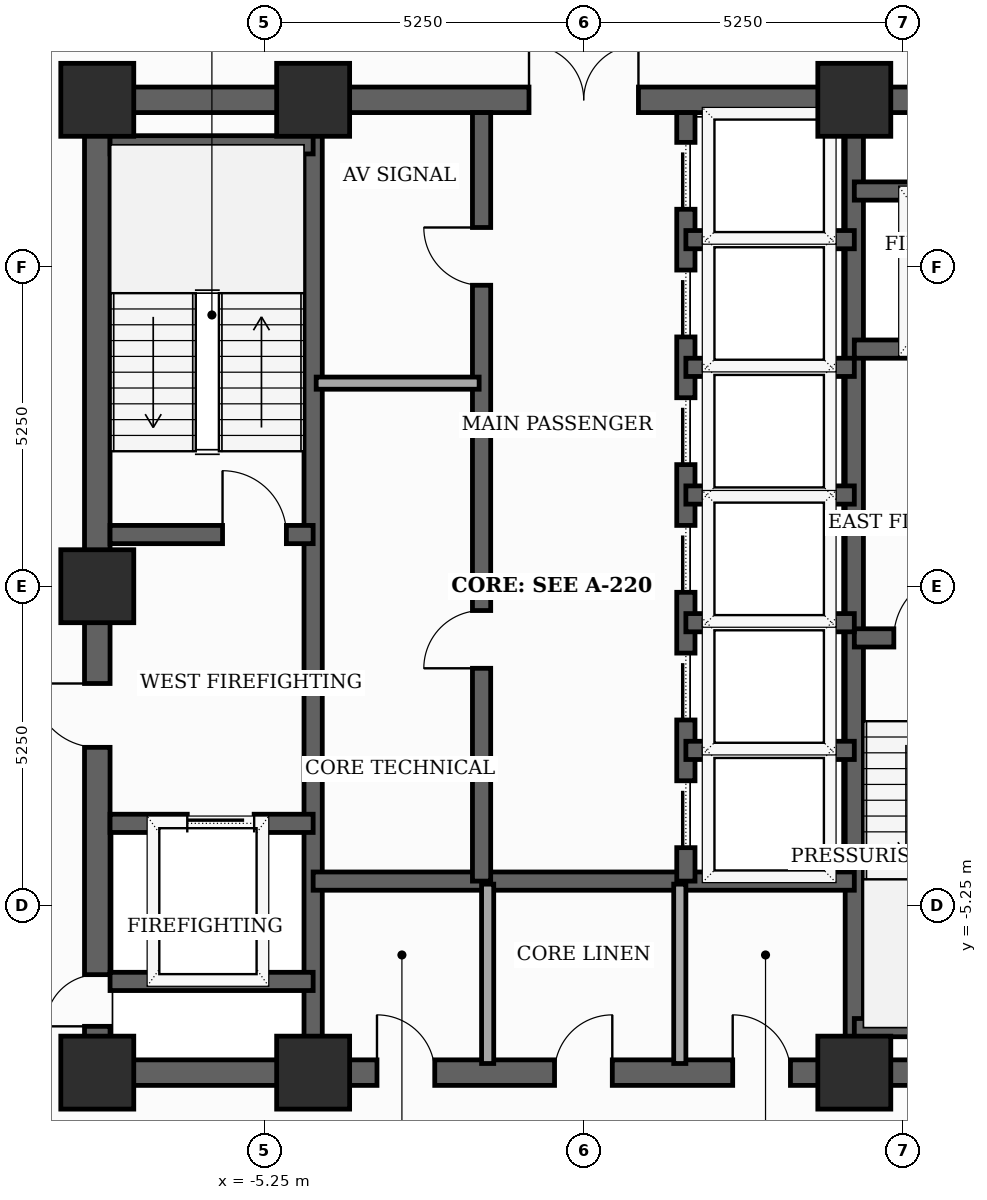
"""IFC4 building model, lengths in metres.
Left out: names, types, materials, properties, quantities, classifications, styles, units other than length and angle.
Written with IfcOpenShell. Run it as: python <this file> out.ifc"""

import sys

from ifc_helpers import new_model, si_unit, direction, frame, frame_2d, origin, origin_2d, place, context, subcontext, project, spatial, rectangle, extrude, element, fill, save


model = new_model("IFC4")
c1 = context("Model", 3, precision=1e-05, world=origin(), true_north=direction((0.0, 1.0)))
c2 = subcontext(c1, "Body", "Model", "MODEL_VIEW")
j1 = project(units=[si_unit("LENGTHUNIT", "METRE"), si_unit("PLANEANGLEUNIT", "RADIAN")], contexts=[c1])
p1 = place(None, origin())
s1 = spatial("IfcSite", under=j1, at=p1, CompositionType="ELEMENT")
p2 = place(p1, origin())
s2 = spatial("IfcBuilding", under=s1, at=p2, CompositionType="ELEMENT")
p3 = place(p2, frame((0.0, 0.0, 202.7)))
s3 = spatial("IfcBuildingStorey", under=s2, at=p3, CompositionType="ELEMENT", Elevation=202.7)
for number, where, z_axis, x_axis in (
    (1, (-8.0, -8.0, 0.0), (0.0, 0.0, 1.0), (1.0, 0.0, 0.0)),
    (2, (-4.45, -8.0, 0.0), (0.0, 0.0, 1.0), (1.0, 0.0, 0.0)),
    (3, (4.45, -8.0, 0.0), (0.0, 0.0, 1.0), (1.0, 0.0, 0.0)),
    (4, (4.45, 8.0, 0.0), (0.0, 0.0, 1.0), (1.0, 0.0, 0.0)),
    (5, (-4.45, 8.0, 0.0), (0.0, 0.0, 1.0), (1.0, 0.0, 0.0)),
    (6, (-8.0, 8.0, 0.0), (0.0, 0.0, 1.0), (1.0, 0.0, 0.0)),
    (7, (-8.0, 0.0, 0.0), (0.0, 0.0, 1.0), (1.0, 0.0, 0.0)),
):
    element("IfcColumn", number, at=place(p3, frame(where, z_axis=z_axis, x_axis=x_axis)), inside=s3, PredefinedType="COLUMN", context=c2, shape_type="SweptSolid", body=[
        extrude(rectangle(XDim=1.2, YDim=1.2, at=origin_2d()), origin(), (0.0, 0.0, 1.0), 3.7),
    ])
p4 = place(p3, frame((-8.0, -8.0, 0.0), z_axis=(0.0, 0.0, 1.0), x_axis=(0.0, 1.0, 0.0)))
e8 = element("IfcWall", 8, at=p4, inside=s3, PredefinedType="SHEAR", context=c2, shape_type="SweptSolid", body=[
    extrude(rectangle(XDim=16.0, YDim=0.42, at=frame_2d((8.0, 0.0))), origin(), (0.0, 0.0, 1.0), 3.5),
])
p5 = place(p4, frame((0.761, 0.0, 0.0)))
e9 = element("IfcOpeningElement", 9, at=p5, cuts=e8, PredefinedType="OPENING", context=c2, shape_type="SweptSolid", body=[
    extrude(rectangle(XDim=0.85, YDim=2.02, at=frame_2d((0.425, 1.01))), frame((0.0, 0.22, 0.0), z_axis=(0.0, -1.0, 0.0), x_axis=(1.0, 0.0, 0.0)), (0.0, 0.0, 1.0), 0.44),
])
p6 = place(p4, frame((5.35, 0.0, 0.0)))
e10 = element("IfcOpeningElement", 10, at=p6, cuts=e8, PredefinedType="OPENING", context=c2, shape_type="SweptSolid", body=[
    extrude(rectangle(XDim=1.05, YDim=2.15, at=frame_2d((0.525, 1.075))), frame((0.0, 0.22, 0.0), z_axis=(0.0, -1.0, 0.0), x_axis=(1.0, 0.0, 0.0)), (0.0, 0.0, 1.0), 0.44),
])
p7 = place(p3, frame((-8.0, -8.0, 0.0), z_axis=(0.0, 0.0, 1.0), x_axis=(1.0, 0.0, 0.0)))
e11 = element("IfcWall", 11, at=p7, inside=s3, PredefinedType="SHEAR", context=c2, shape_type="SweptSolid", body=[
    extrude(rectangle(XDim=16.0, YDim=0.42, at=frame_2d((8.0, 0.0))), origin(), (0.0, 0.0, 1.0), 3.5),
])
p8 = place(p7, frame((4.6, 0.0, 0.0)))
e12 = element("IfcOpeningElement", 12, at=p8, cuts=e11, PredefinedType="OPENING", context=c2, shape_type="SweptSolid", body=[
    extrude(rectangle(XDim=0.95, YDim=2.1, at=frame_2d((0.475, 1.05))), frame((0.0, 0.22, 0.0), z_axis=(0.0, -1.0, 0.0), x_axis=(1.0, 0.0, 0.0)), (0.0, 0.0, 1.0), 0.44),
])
p9 = place(p7, frame((7.52, 0.0, 0.0)))
e13 = element("IfcOpeningElement", 13, at=p9, cuts=e11, PredefinedType="OPENING", context=c2, shape_type="SweptSolid", body=[
    extrude(rectangle(XDim=0.95, YDim=2.1, at=frame_2d((0.475, 1.05))), frame((0.0, 0.22, 0.0), z_axis=(0.0, -1.0, 0.0), x_axis=(1.0, 0.0, 0.0)), (0.0, 0.0, 1.0), 0.44),
])
p10 = place(p7, frame((10.45, 0.0, 0.0)))
e14 = element("IfcOpeningElement", 14, at=p10, cuts=e11, PredefinedType="OPENING", context=c2, shape_type="SweptSolid", body=[
    extrude(rectangle(XDim=0.95, YDim=2.1, at=frame_2d((0.475, 1.05))), frame((0.0, 0.22, 0.0), z_axis=(0.0, -1.0, 0.0), x_axis=(1.0, 0.0, 0.0)), (0.0, 0.0, 1.0), 0.44),
])
p11 = place(p3, frame((-8.0, 8.0, 0.0), z_axis=(0.0, 0.0, 1.0), x_axis=(1.0, 0.0, 0.0)))
e15 = element("IfcWall", 15, at=p11, inside=s3, PredefinedType="SHEAR", context=c2, shape_type="SweptSolid", body=[
    extrude(rectangle(XDim=16.0, YDim=0.42, at=frame_2d((8.0, 0.0))), origin(), (0.0, 0.0, 1.0), 3.5),
])
p12 = place(p11, frame((7.1, 0.0, 0.0)))
e16 = element("IfcOpeningElement", 16, at=p12, cuts=e15, PredefinedType="OPENING", context=c2, shape_type="SweptSolid", body=[
    extrude(rectangle(XDim=1.8, YDim=2.15, at=frame_2d((0.9, 1.075))), frame((0.0, 0.22, 0.0), z_axis=(0.0, -1.0, 0.0), x_axis=(1.0, 0.0, 0.0)), (0.0, 0.0, 1.0), 0.44),
])
for number, where, z_axis, x_axis in (
    (17, (-4.45, -7.79, 0.0), (0.0, 0.0, 1.0), (0.0, 1.0, 0.0)),
    (18, (4.45, -7.79, 0.0), (0.0, 0.0, 1.0), (0.0, 1.0, 0.0)),
):
    element("IfcWall", number, at=place(p3, frame(where, z_axis=z_axis, x_axis=x_axis)), inside=s3, PredefinedType="SHEAR", context=c2, shape_type="SweptSolid", body=[
        extrude(rectangle(XDim=15.58, YDim=0.3, at=frame_2d((7.79, 0.0))), origin(), (0.0, 0.0, 1.0), 3.5),
    ])
p13 = place(p3, frame((-7.79, 0.85, 0.0), z_axis=(0.0, 0.0, 1.0), x_axis=(1.0, 0.0, 0.0)))
e19 = element("IfcWall", 19, at=p13, inside=s3, PredefinedType="SHEAR", context=c2, shape_type="SweptSolid", body=[
    extrude(rectangle(XDim=3.34, YDim=0.3, at=frame_2d((1.67, 0.0))), origin(), (0.0, 0.0, 1.0), 3.5),
])
p14 = place(p13, frame((1.85, 0.0, 0.0)))
e20 = element("IfcOpeningElement", 20, at=p14, cuts=e19, PredefinedType="OPENING", context=c2, shape_type="SweptSolid", body=[
    extrude(rectangle(XDim=1.05, YDim=2.15, at=frame_2d((0.525, 1.075))), frame((0.0, 0.16, 0.0), z_axis=(0.0, -1.0, 0.0), x_axis=(1.0, 0.0, 0.0)), (0.0, 0.0, 1.0), 0.32),
])
p15 = place(p3, frame((-7.79, 7.26, 0.0), z_axis=(0.0, 0.0, 1.0), x_axis=(1.0, 0.0, 0.0)))
e21 = element("IfcWall", 21, at=p15, inside=s3, PredefinedType="SHEAR", context=c2, shape_type="SweptSolid", body=[
    extrude(rectangle(XDim=3.34, YDim=0.3, at=frame_2d((1.67, 0.0))), origin(), (0.0, 0.0, 1.0), 3.5),
])
p16 = place(p3, frame((4.45, -0.85, 0.0), z_axis=(0.0, 0.0, 1.0), x_axis=(1.0, 0.0, 0.0)))
e22 = element("IfcWall", 22, at=p16, inside=s3, PredefinedType="SHEAR", context=c2, shape_type="SweptSolid", body=[
    extrude(rectangle(XDim=3.34, YDim=0.3, at=frame_2d((1.67, 0.0))), origin(), (0.0, 0.0, 1.0), 3.5),
])
p17 = place(p16, frame((0.65, 0.0, 0.0)))
e23 = element("IfcOpeningElement", 23, at=p17, cuts=e22, PredefinedType="OPENING", context=c2, shape_type="SweptSolid", body=[
    extrude(rectangle(XDim=1.05, YDim=2.15, at=frame_2d((0.525, 1.075))), frame((0.0, 0.16, 0.0), z_axis=(0.0, -1.0, 0.0), x_axis=(1.0, 0.0, 0.0)), (0.0, 0.0, 1.0), 0.32),
])
p18 = place(p3, frame((4.45, -7.26, 0.0), z_axis=(0.0, 0.0, 1.0), x_axis=(1.0, 0.0, 0.0)))
e24 = element("IfcWall", 24, at=p18, inside=s3, PredefinedType="SHEAR", context=c2, shape_type="SweptSolid", body=[
    extrude(rectangle(XDim=3.55, YDim=0.3, at=frame_2d((1.775, 0.0))), origin(), (0.0, 0.0, 1.0), 3.5),
])
p19 = place(p3, frame((-7.79, -3.9, 0.0), z_axis=(0.0, 0.0, 1.0), x_axis=(1.0, 0.0, 0.0)))
e25 = element("IfcWall", 25, at=p19, inside=s3, PredefinedType="SHEAR", context=c2, shape_type="SweptSolid", body=[
    extrude(rectangle(XDim=3.34, YDim=0.3, at=frame_2d((1.67, 0.0))), origin(), (0.0, 0.0, 1.0), 3.5),
])
p20 = place(p19, frame((1.27, 0.0, 0.0)))
e26 = element("IfcOpeningElement", 26, at=p20, cuts=e25, PredefinedType="OPENING", context=c2, shape_type="SweptSolid", body=[
    extrude(rectangle(XDim=1.1, YDim=2.1, at=frame_2d((0.55, 1.05))), frame((0.0, 0.16, 0.0), z_axis=(0.0, -1.0, 0.0), x_axis=(1.0, 0.0, 0.0)), (0.0, 0.0, 1.0), 0.32),
])
p21 = place(p3, frame((-7.79, -6.5, 0.0), z_axis=(0.0, 0.0, 1.0), x_axis=(1.0, 0.0, 0.0)))
e27 = element("IfcWall", 27, at=p21, inside=s3, PredefinedType="SHEAR", context=c2, shape_type="SweptSolid", body=[
    extrude(rectangle(XDim=3.34, YDim=0.3, at=frame_2d((1.67, 0.0))), origin(), (0.0, 0.0, 1.0), 3.5),
])
p22 = place(p3, frame((4.45, 3.9, 0.0), z_axis=(0.0, 0.0, 1.0), x_axis=(1.0, 0.0, 0.0)))
e28 = element("IfcWall", 28, at=p22, inside=s3, PredefinedType="SHEAR", context=c2, shape_type="SweptSolid", body=[
    extrude(rectangle(XDim=3.34, YDim=0.3, at=frame_2d((1.67, 0.0))), origin(), (0.0, 0.0, 1.0), 3.5),
])
p23 = place(p22, frame((1.18, 0.0, 0.0)))
e29 = element("IfcOpeningElement", 29, at=p23, cuts=e28, PredefinedType="OPENING", context=c2, shape_type="SweptSolid", body=[
    extrude(rectangle(XDim=1.1, YDim=2.1, at=frame_2d((0.55, 1.05))), frame((0.0, 0.16, 0.0), z_axis=(0.0, -1.0, 0.0), x_axis=(1.0, 0.0, 0.0)), (0.0, 0.0, 1.0), 0.32),
])
p24 = place(p3, frame((4.45, 6.5, 0.0), z_axis=(0.0, 0.0, 1.0), x_axis=(1.0, 0.0, 0.0)))
e30 = element("IfcWall", 30, at=p24, inside=s3, PredefinedType="SHEAR", context=c2, shape_type="SweptSolid", body=[
    extrude(rectangle(XDim=3.34, YDim=0.3, at=frame_2d((1.67, 0.0))), origin(), (0.0, 0.0, 1.0), 3.5),
])
p25 = place(p3, frame((-4.45, -4.85, 0.0), z_axis=(0.0, 0.0, 1.0), x_axis=(1.0, 0.0, 0.0)))
e31 = element("IfcWall", 31, at=p25, inside=s3, PredefinedType="SHEAR", context=c2, shape_type="SweptSolid", body=[
    extrude(rectangle(XDim=8.9, YDim=0.3, at=frame_2d((4.45, 0.0))), origin(), (0.0, 0.0, 1.0), 3.5),
])
p26 = place(p3, frame((-1.68, -4.85, 0.0), z_axis=(0.0, 0.0, 1.0), x_axis=(0.0, 1.0, 0.0)))
e32 = element("IfcWall", 32, at=p26, inside=s3, PredefinedType="SHEAR", context=c2, shape_type="SweptSolid", body=[
    extrude(rectangle(XDim=12.64, YDim=0.3, at=frame_2d((6.32, 0.0))), origin(), (0.0, 0.0, 1.0), 3.5),
])
p27 = place(p26, frame((3.5, 0.0, 0.0)))
e33 = element("IfcOpeningElement", 33, at=p27, cuts=e32, PredefinedType="OPENING", context=c2, shape_type="SweptSolid", body=[
    extrude(rectangle(XDim=0.95, YDim=2.1, at=frame_2d((0.475, 1.05))), frame((0.0, 0.16, 0.0), z_axis=(0.0, -1.0, 0.0), x_axis=(1.0, 0.0, 0.0)), (0.0, 0.0, 1.0), 0.32),
])
p28 = place(p26, frame((9.8, 0.0, 0.0)))
e34 = element("IfcOpeningElement", 34, at=p28, cuts=e32, PredefinedType="OPENING", context=c2, shape_type="SweptSolid", body=[
    extrude(rectangle(XDim=0.95, YDim=2.1, at=frame_2d((0.475, 1.05))), frame((0.0, 0.16, 0.0), z_axis=(0.0, -1.0, 0.0), x_axis=(1.0, 0.0, 0.0)), (0.0, 0.0, 1.0), 0.32),
])
p29 = place(p3, frame((1.68, -4.85, 0.0), z_axis=(0.0, 0.0, 1.0), x_axis=(0.0, 1.0, 0.0)))
e35 = element("IfcWall", 35, at=p29, inside=s3, PredefinedType="SHEAR", context=c2, shape_type="SweptSolid", body=[
    extrude(rectangle(XDim=12.64, YDim=0.3, at=frame_2d((6.32, 0.0))), origin(), (0.0, 0.0, 1.0), 3.5),
])
p30 = place(p29, frame((0.55, 0.0, 0.0)))
e36 = element("IfcOpeningElement", 36, at=p30, cuts=e35, PredefinedType="OPENING", context=c2, shape_type="SweptSolid", body=[
    extrude(rectangle(XDim=1.1, YDim=2.1, at=frame_2d((0.55, 1.05))), frame((0.0, 0.16, 0.0), z_axis=(0.0, -1.0, 0.0), x_axis=(1.0, 0.0, 0.0)), (0.0, 0.0, 1.0), 0.32),
])
p31 = place(p29, frame((2.65, 0.0, 0.0)))
e37 = element("IfcOpeningElement", 37, at=p31, cuts=e35, PredefinedType="OPENING", context=c2, shape_type="SweptSolid", body=[
    extrude(rectangle(XDim=1.1, YDim=2.1, at=frame_2d((0.55, 1.05))), frame((0.0, 0.16, 0.0), z_axis=(0.0, -1.0, 0.0), x_axis=(1.0, 0.0, 0.0)), (0.0, 0.0, 1.0), 0.32),
])
p32 = place(p29, frame((4.75, 0.0, 0.0)))
e38 = element("IfcOpeningElement", 38, at=p32, cuts=e35, PredefinedType="OPENING", context=c2, shape_type="SweptSolid", body=[
    extrude(rectangle(XDim=1.1, YDim=2.1, at=frame_2d((0.55, 1.05))), frame((0.0, 0.16, 0.0), z_axis=(0.0, -1.0, 0.0), x_axis=(1.0, 0.0, 0.0)), (0.0, 0.0, 1.0), 0.32),
])
p33 = place(p29, frame((6.85, 0.0, 0.0)))
e39 = element("IfcOpeningElement", 39, at=p33, cuts=e35, PredefinedType="OPENING", context=c2, shape_type="SweptSolid", body=[
    extrude(rectangle(XDim=1.1, YDim=2.1, at=frame_2d((0.55, 1.05))), frame((0.0, 0.16, 0.0), z_axis=(0.0, -1.0, 0.0), x_axis=(1.0, 0.0, 0.0)), (0.0, 0.0, 1.0), 0.32),
])
p34 = place(p29, frame((8.95, 0.0, 0.0)))
e40 = element("IfcOpeningElement", 40, at=p34, cuts=e35, PredefinedType="OPENING", context=c2, shape_type="SweptSolid", body=[
    extrude(rectangle(XDim=1.1, YDim=2.1, at=frame_2d((0.55, 1.05))), frame((0.0, 0.16, 0.0), z_axis=(0.0, -1.0, 0.0), x_axis=(1.0, 0.0, 0.0)), (0.0, 0.0, 1.0), 0.32),
])
p35 = place(p29, frame((11.05, 0.0, 0.0)))
e41 = element("IfcOpeningElement", 41, at=p35, cuts=e35, PredefinedType="OPENING", context=c2, shape_type="SweptSolid", body=[
    extrude(rectangle(XDim=1.1, YDim=2.1, at=frame_2d((0.55, 1.05))), frame((0.0, 0.16, 0.0), z_axis=(0.0, -1.0, 0.0), x_axis=(1.0, 0.0, 0.0)), (0.0, 0.0, 1.0), 0.32),
])
for number, where, z_axis, x_axis in (
    (42, (1.68, 1.5, 0.0), (0.0, 0.0, 1.0), (1.0, 0.0, 0.0)),
    (43, (1.68, 3.6, 0.0), (0.0, 0.0, 1.0), (1.0, 0.0, 0.0)),
    (44, (1.68, 5.7, 0.0), (0.0, 0.0, 1.0), (1.0, 0.0, 0.0)),
    (45, (1.68, -2.7, 0.0), (0.0, 0.0, 1.0), (1.0, 0.0, 0.0)),
    (46, (1.68, -0.6, 0.0), (0.0, 0.0, 1.0), (1.0, 0.0, 0.0)),
):
    element("IfcWall", number, at=place(p3, frame(where, z_axis=z_axis, x_axis=x_axis)), inside=s3, PredefinedType="SHEAR", context=c2, shape_type="SweptSolid", body=[
        extrude(rectangle(XDim=2.77, YDim=0.3, at=frame_2d((1.385, 0.0))), origin(), (0.0, 0.0, 1.0), 3.5),
    ])
for number, where, z_axis, x_axis in (
    (47, (-1.58, -7.85, 0.0), (0.0, 0.0, 1.0), (0.0, 1.0, 0.0)),
    (48, (1.58, -7.85, 0.0), (0.0, 0.0, 1.0), (0.0, 1.0, 0.0)),
):
    element("IfcWall", number, at=place(p3, frame(where, z_axis=z_axis, x_axis=x_axis)), inside=s3, PredefinedType="SOLIDWALL", context=c2, shape_type="SweptSolid", body=[
        extrude(rectangle(XDim=2.95, YDim=0.2, at=frame_2d((1.475, 0.0))), origin(), (0.0, 0.0, 1.0), 2.885),
    ])
p36 = place(p3, frame((-4.4, 3.34, 0.0), z_axis=(0.0, 0.0, 1.0), x_axis=(1.0, 0.0, 0.0)))
e49 = element("IfcWall", 49, at=p36, inside=s3, PredefinedType="SOLIDWALL", context=c2, shape_type="SweptSolid", body=[
    extrude(rectangle(XDim=2.68, YDim=0.2, at=frame_2d((1.34, 0.0))), origin(), (0.0, 0.0, 1.0), 3.5),
])
p37 = place(p5, origin())
e50 = element("IfcDoor", 50, at=p37, inside=s3, OperationType="SINGLE_SWING_LEFT", PredefinedType="TRAPDOOR", context=c2, shape_type="SweptSolid", body=[
    extrude(rectangle(XDim=0.85, YDim=2.02, at=frame_2d((0.425, 1.01))), frame((0.0, 0.025, 0.0), z_axis=(0.0, -1.0, 0.0), x_axis=(1.0, 0.0, 0.0)), (0.0, 0.0, 1.0), 0.05),
])
fill(e9, e50)
p38 = place(p6, origin())
e51 = element("IfcDoor", 51, at=p38, inside=s3, OperationType="SINGLE_SWING_RIGHT", PredefinedType="DOOR", context=c2, shape_type="SweptSolid", body=[
    extrude(rectangle(XDim=1.05, YDim=2.15, at=frame_2d((0.525, 1.075))), frame((0.0, 0.025, 0.0), z_axis=(0.0, -1.0, 0.0), x_axis=(1.0, 0.0, 0.0)), (0.0, 0.0, 1.0), 0.05),
])
fill(e10, e51)
p39 = place(p8, origin())
e52 = element("IfcDoor", 52, at=p39, inside=s3, OperationType="SINGLE_SWING_LEFT", PredefinedType="DOOR", context=c2, shape_type="SweptSolid", body=[
    extrude(rectangle(XDim=0.95, YDim=2.1, at=frame_2d((0.475, 1.05))), frame((0.0, 0.025, 0.0), z_axis=(0.0, -1.0, 0.0), x_axis=(1.0, 0.0, 0.0)), (0.0, 0.0, 1.0), 0.05),
])
fill(e12, e52)
p40 = place(p9, origin())
e53 = element("IfcDoor", 53, at=p40, inside=s3, OperationType="SINGLE_SWING_RIGHT", PredefinedType="DOOR", context=c2, shape_type="SweptSolid", body=[
    extrude(rectangle(XDim=0.95, YDim=2.1, at=frame_2d((0.475, 1.05))), frame((0.0, 0.025, 0.0), z_axis=(0.0, -1.0, 0.0), x_axis=(1.0, 0.0, 0.0)), (0.0, 0.0, 1.0), 0.05),
])
fill(e13, e53)
p41 = place(p10, origin())
e54 = element("IfcDoor", 54, at=p41, inside=s3, OperationType="SINGLE_SWING_LEFT", PredefinedType="DOOR", context=c2, shape_type="SweptSolid", body=[
    extrude(rectangle(XDim=0.95, YDim=2.1, at=frame_2d((0.475, 1.05))), frame((0.0, 0.025, 0.0), z_axis=(0.0, -1.0, 0.0), x_axis=(1.0, 0.0, 0.0)), (0.0, 0.0, 1.0), 0.05),
])
fill(e14, e54)
p42 = place(p12, origin())
e55 = element("IfcDoor", 55, at=p42, inside=s3, OperationType="DOUBLE_DOOR_SINGLE_SWING", PredefinedType="DOOR", context=c2, shape_type="SweptSolid", body=[
    extrude(rectangle(XDim=1.8, YDim=2.15, at=frame_2d((0.9, 1.075))), frame((0.0, 0.025, 0.0), z_axis=(0.0, -1.0, 0.0), x_axis=(1.0, 0.0, 0.0)), (0.0, 0.0, 1.0), 0.05),
])
fill(e16, e55)
p43 = place(p14, origin())
e56 = element("IfcDoor", 56, at=p43, inside=s3, OperationType="SINGLE_SWING_LEFT", PredefinedType="DOOR", context=c2, shape_type="SweptSolid", body=[
    extrude(rectangle(XDim=1.05, YDim=2.15, at=frame_2d((0.525, 1.075))), frame((0.0, 0.025, 0.0), z_axis=(0.0, -1.0, 0.0), x_axis=(1.0, 0.0, 0.0)), (0.0, 0.0, 1.0), 0.05),
])
fill(e20, e56)
p44 = place(p17, origin())
e57 = element("IfcDoor", 57, at=p44, inside=s3, OperationType="SINGLE_SWING_RIGHT", PredefinedType="DOOR", context=c2, shape_type="SweptSolid", body=[
    extrude(rectangle(XDim=1.05, YDim=2.15, at=frame_2d((0.525, 1.075))), frame((0.0, 0.025, 0.0), z_axis=(0.0, -1.0, 0.0), x_axis=(1.0, 0.0, 0.0)), (0.0, 0.0, 1.0), 0.05),
])
fill(e23, e57)
p45 = place(p20, origin())
e58 = element("IfcDoor", 58, at=p45, inside=s3, OperationType="SLIDING_TO_LEFT", PredefinedType="DOOR", context=c2, shape_type="SweptSolid", body=[
    extrude(rectangle(XDim=1.1, YDim=2.1, at=frame_2d((0.55, 1.05))), frame((0.0, 0.025, 0.0), z_axis=(0.0, -1.0, 0.0), x_axis=(1.0, 0.0, 0.0)), (0.0, 0.0, 1.0), 0.05),
])
fill(e26, e58)
p46 = place(p27, origin())
e59 = element("IfcDoor", 59, at=p46, inside=s3, OperationType="SINGLE_SWING_LEFT", PredefinedType="DOOR", context=c2, shape_type="SweptSolid", body=[
    extrude(rectangle(XDim=0.95, YDim=2.1, at=frame_2d((0.475, 1.05))), frame((0.0, 0.025, 0.0), z_axis=(0.0, -1.0, 0.0), x_axis=(1.0, 0.0, 0.0)), (0.0, 0.0, 1.0), 0.05),
])
fill(e33, e59)
p47 = place(p28, origin())
e60 = element("IfcDoor", 60, at=p47, inside=s3, OperationType="SINGLE_SWING_RIGHT", PredefinedType="DOOR", context=c2, shape_type="SweptSolid", body=[
    extrude(rectangle(XDim=0.95, YDim=2.1, at=frame_2d((0.475, 1.05))), frame((0.0, 0.025, 0.0), z_axis=(0.0, -1.0, 0.0), x_axis=(1.0, 0.0, 0.0)), (0.0, 0.0, 1.0), 0.05),
])
fill(e34, e60)
p48 = place(p30, origin())
e61 = element("IfcDoor", 61, at=p48, inside=s3, OperationType="SLIDING_TO_LEFT", PredefinedType="DOOR", context=c2, shape_type="SweptSolid", body=[
    extrude(rectangle(XDim=1.1, YDim=2.1, at=frame_2d((0.55, 1.05))), frame((0.0, 0.025, 0.0), z_axis=(0.0, -1.0, 0.0), x_axis=(1.0, 0.0, 0.0)), (0.0, 0.0, 1.0), 0.05),
])
fill(e36, e61)
p49 = place(p31, origin())
e62 = element("IfcDoor", 62, at=p49, inside=s3, OperationType="SLIDING_TO_LEFT", PredefinedType="DOOR", context=c2, shape_type="SweptSolid", body=[
    extrude(rectangle(XDim=1.1, YDim=2.1, at=frame_2d((0.55, 1.05))), frame((0.0, 0.025, 0.0), z_axis=(0.0, -1.0, 0.0), x_axis=(1.0, 0.0, 0.0)), (0.0, 0.0, 1.0), 0.05),
])
fill(e37, e62)
p50 = place(p32, origin())
e63 = element("IfcDoor", 63, at=p50, inside=s3, OperationType="SLIDING_TO_LEFT", PredefinedType="DOOR", context=c2, shape_type="SweptSolid", body=[
    extrude(rectangle(XDim=1.1, YDim=2.1, at=frame_2d((0.55, 1.05))), frame((0.0, 0.025, 0.0), z_axis=(0.0, -1.0, 0.0), x_axis=(1.0, 0.0, 0.0)), (0.0, 0.0, 1.0), 0.05),
])
fill(e38, e63)
p51 = place(p33, origin())
e64 = element("IfcDoor", 64, at=p51, inside=s3, OperationType="SLIDING_TO_LEFT", PredefinedType="DOOR", context=c2, shape_type="SweptSolid", body=[
    extrude(rectangle(XDim=1.1, YDim=2.1, at=frame_2d((0.55, 1.05))), frame((0.0, 0.025, 0.0), z_axis=(0.0, -1.0, 0.0), x_axis=(1.0, 0.0, 0.0)), (0.0, 0.0, 1.0), 0.05),
])
fill(e39, e64)
p52 = place(p34, origin())
e65 = element("IfcDoor", 65, at=p52, inside=s3, OperationType="SLIDING_TO_LEFT", PredefinedType="DOOR", context=c2, shape_type="SweptSolid", body=[
    extrude(rectangle(XDim=1.1, YDim=2.1, at=frame_2d((0.55, 1.05))), frame((0.0, 0.025, 0.0), z_axis=(0.0, -1.0, 0.0), x_axis=(1.0, 0.0, 0.0)), (0.0, 0.0, 1.0), 0.05),
])
fill(e40, e65)
p53 = place(p35, origin())
e66 = element("IfcDoor", 66, at=p53, inside=s3, OperationType="SLIDING_TO_LEFT", PredefinedType="DOOR", context=c2, shape_type="SweptSolid", body=[
    extrude(rectangle(XDim=1.1, YDim=2.1, at=frame_2d((0.55, 1.05))), frame((0.0, 0.025, 0.0), z_axis=(0.0, -1.0, 0.0), x_axis=(1.0, 0.0, 0.0)), (0.0, 0.0, 1.0), 0.05),
])
fill(e41, e66)
save(model, sys.argv[1])
